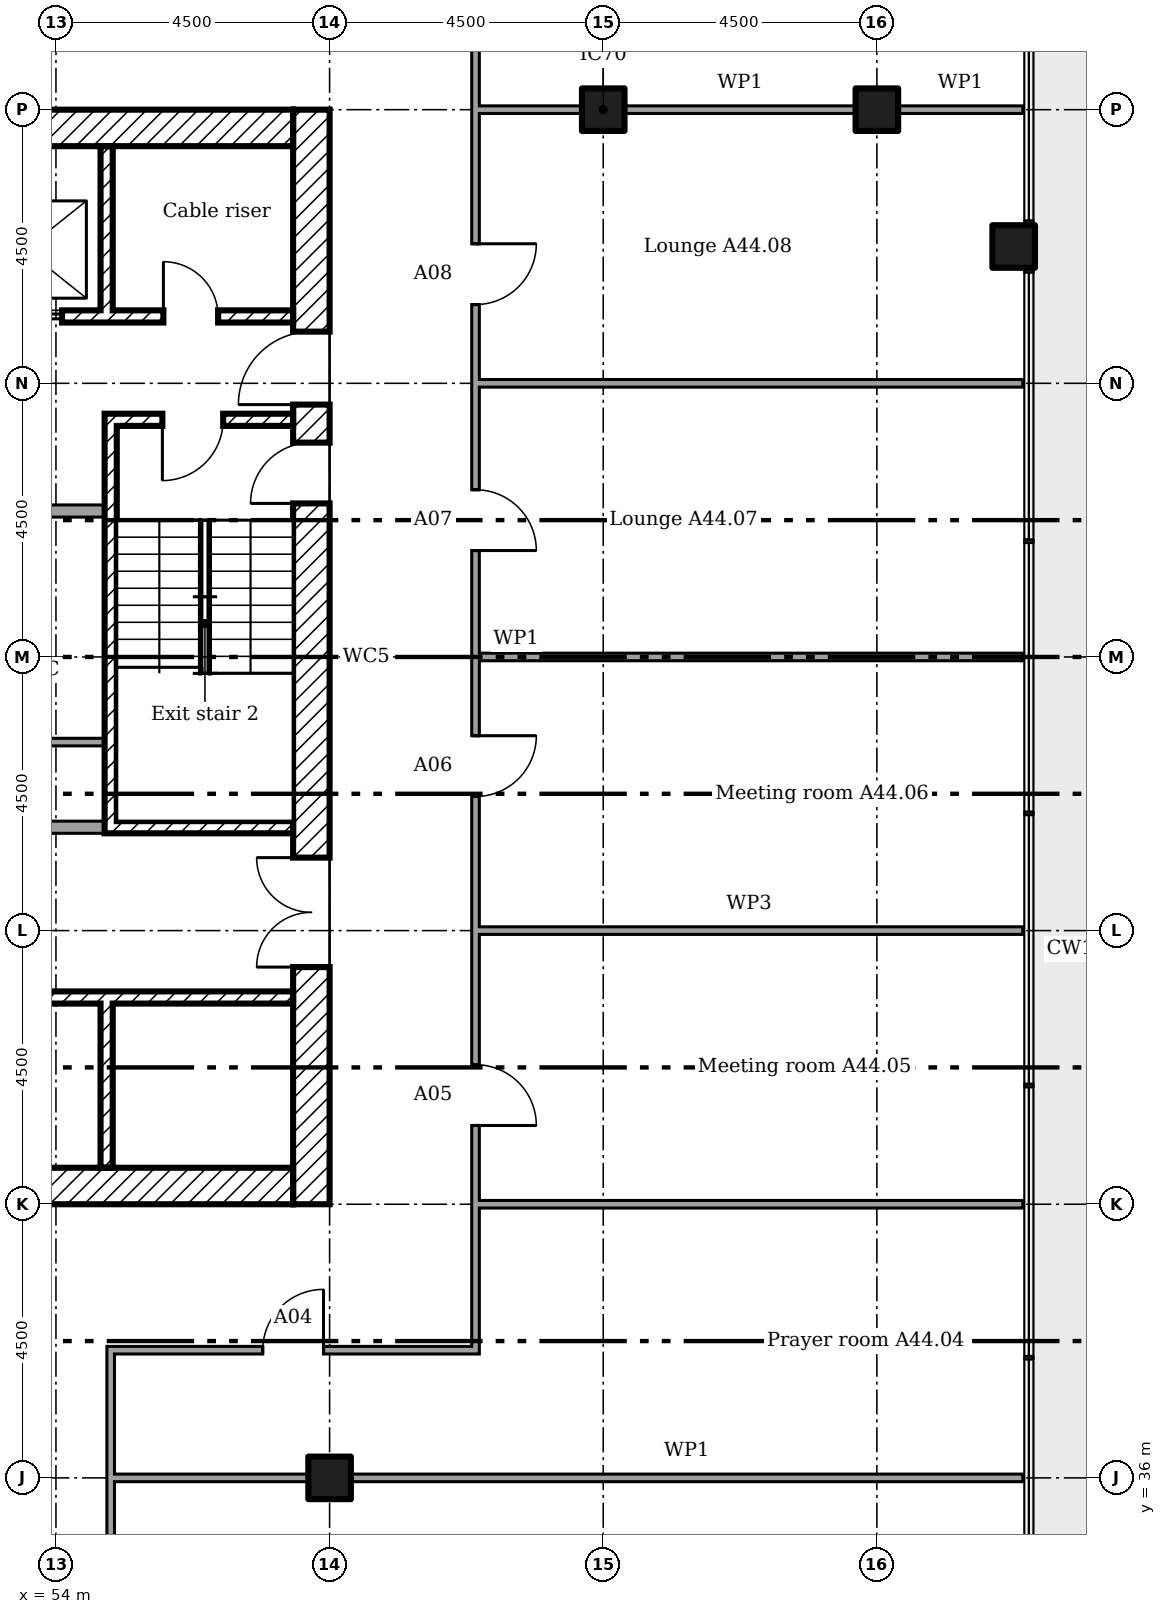
"""IFC4 building model, lengths in metres.
Left out: names, types, materials, properties, quantities, classifications, styles, units other than length and angle.
Written with IfcOpenShell. Run it as: python <this file> out.ifc"""

import sys

from ifc_helpers import new_model, si_unit, direction, frame, frame_2d, origin, origin_2d, place, context, subcontext, project, spatial, rectangle, extrude, element, fill, save


model = new_model("IFC4")
c1 = context("Model", 3, precision=1e-05, world=origin(), true_north=direction((0.0, 1.0)))
c2 = subcontext(c1, "Body", "Model", "MODEL_VIEW")
j1 = project(units=[si_unit("LENGTHUNIT", "METRE"), si_unit("PLANEANGLEUNIT", "RADIAN")], contexts=[c1])
p1 = place(None, origin())
s1 = spatial("IfcSite", under=j1, at=p1, CompositionType="ELEMENT")
p2 = place(p1, origin())
s2 = spatial("IfcBuilding", under=s1, at=p2, CompositionType="ELEMENT")
p3 = place(p2, frame((0.0, 0.0, 176.2)))
s3 = spatial("IfcBuildingStorey", under=s2, at=p3, CompositionType="ELEMENT", Elevation=176.2)
for number, where in (
    (1, (58.5, 36.0, 0.0)),
    (2, (63.0, 58.5, 0.0)),
    (3, (67.5, 58.5, 0.0)),
    (4, (69.75, 56.25, 0.0)),
):
    element("IfcColumn", number, at=place(p3, frame(where)), inside=s3, PredefinedType="COLUMN", context=c2, shape_type="SweptSolid", body=[
        extrude(rectangle(XDim=0.7, YDim=0.7, at=origin_2d()), origin(), (0.0, 0.0, 1.0), 3.6),
    ])
p4 = place(p3, frame((58.2, 40.5, 0.0), z_axis=(0.0, 0.0, 1.0), x_axis=(0.0, 1.0, 0.0)))
e5 = element("IfcWall", 5, at=p4, inside=s3, PredefinedType="SHEAR", context=c2, shape_type="SweptSolid", body=[
    extrude(rectangle(XDim=18.0, YDim=0.6, at=frame_2d((9.0, 0.0))), origin(), (0.0, 0.0, 1.0), 3.35),
])
p5 = place(p4, frame((13.15, 0.0, 0.0)))
e6 = element("IfcOpeningElement", 6, at=p5, cuts=e5, PredefinedType="OPENING", context=c2, shape_type="SweptSolid", body=[
    extrude(rectangle(XDim=1.2, YDim=2.1, at=frame_2d((0.6, 1.05))), frame((0.0, 0.31, 0.0), z_axis=(0.0, -1.0, 0.0), x_axis=(1.0, 0.0, 0.0)), (0.0, 0.0, 1.0), 0.62),
])
p6 = place(p4, frame((3.9, 0.0, 0.0)))
e7 = element("IfcOpeningElement", 7, at=p6, cuts=e5, PredefinedType="OPENING", context=c2, shape_type="SweptSolid", body=[
    extrude(rectangle(XDim=1.8, YDim=2.1, at=frame_2d((0.9, 1.05))), frame((0.0, 0.31, 0.0), z_axis=(0.0, -1.0, 0.0), x_axis=(1.0, 0.0, 0.0)), (0.0, 0.0, 1.0), 0.62),
])
p7 = place(p4, frame((11.525, 0.0, 0.0)))
e8 = element("IfcOpeningElement", 8, at=p7, cuts=e5, PredefinedType="OPENING", context=c2, shape_type="SweptSolid", body=[
    extrude(rectangle(XDim=1.0, YDim=2.1, at=frame_2d((0.5, 1.05))), frame((0.0, 0.31, 0.0), z_axis=(0.0, -1.0, 0.0), x_axis=(1.0, 0.0, 0.0)), (0.0, 0.0, 1.0), 0.62),
])
for number, where in (
    (9, (40.5, 58.2, 0.0)),
    (10, (40.5, 40.8, 0.0)),
):
    element("IfcWall", number, at=place(p3, frame(where)), inside=s3, PredefinedType="SHEAR", context=c2, shape_type="SweptSolid", body=[
        extrude(rectangle(XDim=17.4, YDim=0.6, at=frame_2d((8.7, 0.0))), origin(), (0.0, 0.0, 1.0), 3.35),
    ])
for number, where, z_axis, x_axis in (
    (11, (54.833, 57.9, 0.0), (0.0, 0.0, 1.0), (0.0, -1.0, 0.0)),
    (12, (54.833, 41.1, 0.0), (0.0, 0.0, 1.0), (0.0, 1.0, 0.0)),
):
    element("IfcWall", number, at=place(p3, frame(where, z_axis=z_axis, x_axis=x_axis)), inside=s3, PredefinedType="SHEAR", context=c2, shape_type="SweptSolid", body=[
        extrude(rectangle(XDim=2.7, YDim=0.2, at=frame_2d((1.35, 0.0))), origin(), (0.0, 0.0, 1.0), 3.35),
    ])
p8 = place(p3, frame((46.933, 55.1, 0.0)))
e13 = element("IfcWall", 13, at=p8, inside=s3, PredefinedType="SHEAR", context=c2, shape_type="SweptSolid", body=[
    extrude(rectangle(XDim=10.967, YDim=0.2, at=frame_2d((5.483, 0.0))), origin(), (0.0, 0.0, 1.0), 3.35),
])
p9 = place(p8, frame((8.833, 0.0, 0.0)))
e14 = element("IfcOpeningElement", 14, at=p9, cuts=e13, PredefinedType="OPENING", context=c2, shape_type="SweptSolid", body=[
    extrude(rectangle(XDim=0.9, YDim=2.1, at=frame_2d((0.45, 1.05))), frame((0.0, 0.11, 0.0), z_axis=(0.0, -1.0, 0.0), x_axis=(1.0, 0.0, 0.0)), (0.0, 0.0, 1.0), 0.22),
])
p10 = place(p8, frame((0.633, 0.0, 0.0)))
e15 = element("IfcOpeningElement", 15, at=p10, cuts=e13, PredefinedType="OPENING", context=c2, shape_type="SweptSolid", body=[
    extrude(rectangle(XDim=1.2, YDim=2.1, at=frame_2d((0.6, 1.05))), frame((0.0, 0.11, 0.0), z_axis=(0.0, -1.0, 0.0), x_axis=(1.0, 0.0, 0.0)), (0.0, 0.0, 1.0), 0.22),
])
p11 = place(p8, frame((3.3, 0.0, 0.0)))
e16 = element("IfcOpeningElement", 16, at=p11, cuts=e13, PredefinedType="OPENING", context=c2, shape_type="SweptSolid", body=[
    extrude(rectangle(XDim=1.2, YDim=2.1, at=frame_2d((0.6, 1.05))), frame((0.0, 0.11, 0.0), z_axis=(0.0, -1.0, 0.0), x_axis=(1.0, 0.0, 0.0)), (0.0, 0.0, 1.0), 0.22),
])
p12 = place(p8, frame((5.967, 0.0, 0.0)))
e17 = element("IfcOpeningElement", 17, at=p12, cuts=e13, PredefinedType="OPENING", context=c2, shape_type="SweptSolid", body=[
    extrude(rectangle(XDim=1.2, YDim=2.1, at=frame_2d((0.6, 1.05))), frame((0.0, 0.11, 0.0), z_axis=(0.0, -1.0, 0.0), x_axis=(1.0, 0.0, 0.0)), (0.0, 0.0, 1.0), 0.22),
])
p13 = place(p3, frame((41.1, 43.9, 0.0)))
e18 = element("IfcWall", 18, at=p13, inside=s3, PredefinedType="SHEAR", context=c2, shape_type="SweptSolid", body=[
    extrude(rectangle(XDim=16.8, YDim=0.2, at=frame_2d((8.4, 0.0))), origin(), (0.0, 0.0, 1.0), 3.35),
])
p14 = place(p13, frame((1.283, 0.0, 0.0)))
e19 = element("IfcOpeningElement", 19, at=p14, cuts=e18, PredefinedType="OPENING", context=c2, shape_type="SweptSolid", body=[
    extrude(rectangle(XDim=0.9, YDim=2.1, at=frame_2d((0.45, 1.05))), frame((0.0, 0.11, 0.0), z_axis=(0.0, -1.0, 0.0), x_axis=(1.0, 0.0, 0.0)), (0.0, 0.0, 1.0), 0.22),
])
p15 = place(p13, frame((7.95, 0.0, 0.0)))
e20 = element("IfcOpeningElement", 20, at=p15, cuts=e18, PredefinedType="OPENING", context=c2, shape_type="SweptSolid", body=[
    extrude(rectangle(XDim=0.9, YDim=2.1, at=frame_2d((0.45, 1.05))), frame((0.0, 0.11, 0.0), z_axis=(0.0, -1.0, 0.0), x_axis=(1.0, 0.0, 0.0)), (0.0, 0.0, 1.0), 0.22),
])
p16 = place(p3, frame((54.8, 53.4, 0.0)))
e21 = element("IfcWall", 21, at=p16, inside=s3, PredefinedType="SHEAR", context=c2, shape_type="SweptSolid", body=[
    extrude(rectangle(XDim=3.1, YDim=0.2, at=frame_2d((1.55, 0.0))), origin(), (0.0, 0.0, 1.0), 3.35),
])
p17 = place(p16, frame((0.95, 0.0, 0.0)))
e22 = element("IfcOpeningElement", 22, at=p17, cuts=e21, PredefinedType="OPENING", context=c2, shape_type="SweptSolid", body=[
    extrude(rectangle(XDim=1.0, YDim=2.1, at=frame_2d((0.5, 1.05))), frame((0.0, 0.11, 0.0), z_axis=(0.0, -1.0, 0.0), x_axis=(1.0, 0.0, 0.0)), (0.0, 0.0, 1.0), 0.22),
])
p18 = place(p3, frame((54.8, 46.7, 0.0)))
e23 = element("IfcWall", 23, at=p18, inside=s3, PredefinedType="SHEAR", context=c2, shape_type="SweptSolid", body=[
    extrude(rectangle(XDim=3.1, YDim=0.2, at=frame_2d((1.55, 0.0))), origin(), (0.0, 0.0, 1.0), 3.35),
])
p19 = place(p3, frame((54.9, 46.8, 0.0), z_axis=(0.0, 0.0, 1.0), x_axis=(0.0, 1.0, 0.0)))
e24 = element("IfcWall", 24, at=p19, inside=s3, PredefinedType="SHEAR", context=c2, shape_type="SweptSolid", body=[
    extrude(rectangle(XDim=6.5, YDim=0.2, at=frame_2d((3.25, 0.0))), origin(), (0.0, 0.0, 1.0), 3.35),
])
p20 = place(p3, frame((44.2, 51.9, 0.0)))
e25 = element("IfcWall", 25, at=p20, inside=s3, PredefinedType="PARTITIONING", context=c2, shape_type="SweptSolid", body=[
    extrude(rectangle(XDim=10.6, YDim=0.2, at=frame_2d((5.3, 0.0))), origin(), (0.0, 0.0, 1.0), 3.35),
])
p21 = place(p20, frame((4.625, 0.0, 0.0)))
e26 = element("IfcOpeningElement", 26, at=p21, cuts=e25, PredefinedType="OPENING", context=c2, shape_type="SweptSolid", body=[
    extrude(rectangle(XDim=0.9, YDim=2.1, at=frame_2d((0.45, 1.05))), frame((0.0, 0.11, 0.0), z_axis=(0.0, -1.0, 0.0), x_axis=(1.0, 0.0, 0.0)), (0.0, 0.0, 1.0), 0.22),
])
p22 = place(p20, frame((6.25, 0.0, 0.0)))
e27 = element("IfcOpeningElement", 27, at=p22, cuts=e25, PredefinedType="OPENING", context=c2, shape_type="SweptSolid", body=[
    extrude(rectangle(XDim=0.9, YDim=2.1, at=frame_2d((0.45, 1.05))), frame((0.0, 0.11, 0.0), z_axis=(0.0, -1.0, 0.0), x_axis=(1.0, 0.0, 0.0)), (0.0, 0.0, 1.0), 0.22),
])
p23 = place(p20, frame((8.7, 0.0, 0.0)))
e28 = element("IfcOpeningElement", 28, at=p23, cuts=e25, PredefinedType="OPENING", context=c2, shape_type="SweptSolid", body=[
    extrude(rectangle(XDim=0.9, YDim=2.1, at=frame_2d((0.45, 1.05))), frame((0.0, 0.11, 0.0), z_axis=(0.0, -1.0, 0.0), x_axis=(1.0, 0.0, 0.0)), (0.0, 0.0, 1.0), 0.22),
])
p24 = place(p3, frame((44.2, 46.7, 0.0)))
e29 = element("IfcWall", 29, at=p24, inside=s3, PredefinedType="PARTITIONING", context=c2, shape_type="SweptSolid", body=[
    extrude(rectangle(XDim=10.6, YDim=0.2, at=frame_2d((5.3, 0.0))), origin(), (0.0, 0.0, 1.0), 3.35),
])
p25 = place(p24, frame((4.85, 0.0, 0.0)))
e30 = element("IfcOpeningElement", 30, at=p25, cuts=e29, PredefinedType="OPENING", context=c2, shape_type="SweptSolid", body=[
    extrude(rectangle(XDim=0.9, YDim=2.1, at=frame_2d((0.45, 1.05))), frame((0.0, 0.11, 0.0), z_axis=(0.0, -1.0, 0.0), x_axis=(1.0, 0.0, 0.0)), (0.0, 0.0, 1.0), 0.22),
])
p26 = place(p3, frame((54.8, 48.1, 0.0), z_axis=(0.0, 0.0, 1.0), x_axis=(-1.0, 0.0, 0.0)))
e31 = element("IfcWall", 31, at=p26, inside=s3, PredefinedType="PARTITIONING", context=c2, shape_type="SweptSolid", body=[
    extrude(rectangle(XDim=2.9, YDim=0.125, at=frame_2d((1.45, 0.0))), origin(), (0.0, 0.0, 1.0), 3.35),
])
p27 = place(p3, frame((54.9, 36.0, 0.0)))
e32 = element("IfcWall", 32, at=p27, inside=s3, PredefinedType="PARTITIONING", context=c2, shape_type="SweptSolid", body=[
    extrude(rectangle(XDim=3.25, YDim=0.125, at=frame_2d((1.625, 0.0))), origin(), (0.0, 0.0, 1.0), 3.45),
])
p28 = place(p3, frame((58.85, 36.0, 0.0)))
e33 = element("IfcWall", 33, at=p28, inside=s3, PredefinedType="PARTITIONING", context=c2, shape_type="SweptSolid", body=[
    extrude(rectangle(XDim=11.05, YDim=0.125, at=frame_2d((5.525, 0.0))), origin(), (0.0, 0.0, 1.0), 2.766),
])
p29 = place(p3, frame((54.837, 38.1, 0.0)))
e34 = element("IfcWall", 34, at=p29, inside=s3, PredefinedType="PARTITIONING", context=c2, shape_type="SweptSolid", body=[
    extrude(rectangle(XDim=6.125, YDim=0.125, at=frame_2d((3.062, 0.0))), origin(), (0.0, 0.0, 1.0), 3.45),
])
p30 = place(p29, frame((2.562, 0.0, 0.0)))
e35 = element("IfcOpeningElement", 35, at=p30, cuts=e34, PredefinedType="OPENING", context=c2, shape_type="SweptSolid", body=[
    extrude(rectangle(XDim=1.0, YDim=2.1, at=frame_2d((0.5, 1.05))), frame((0.0, 0.073, 0.0), z_axis=(0.0, -1.0, 0.0), x_axis=(1.0, 0.0, 0.0)), (0.0, 0.0, 1.0), 0.145),
])
p31 = place(p3, frame((60.9, 40.5, 0.0)))
e36 = element("IfcWall", 36, at=p31, inside=s3, PredefinedType="PARTITIONING", context=c2, shape_type="SweptSolid", body=[
    extrude(rectangle(XDim=9.0, YDim=0.125, at=frame_2d((4.5, 0.0))), origin(), (0.0, 0.0, 1.0), 2.766),
])
p32 = place(p3, frame((60.9, 45.0, 0.0)))
e37 = element("IfcWall", 37, at=p32, inside=s3, PredefinedType="MOVABLE", context=c2, shape_type="SweptSolid", body=[
    extrude(rectangle(XDim=9.0, YDim=0.125, at=frame_2d((4.5, 0.0))), origin(), (0.0, 0.0, 1.0), 2.766),
])
for number, where in (
    (38, (60.9, 49.5, 0.0)),
    (39, (60.9, 54.0, 0.0)),
):
    element("IfcWall", number, at=place(p3, frame(where)), inside=s3, PredefinedType="PARTITIONING", context=c2, shape_type="SweptSolid", body=[
        extrude(rectangle(XDim=9.0, YDim=0.125, at=frame_2d((4.5, 0.0))), origin(), (0.0, 0.0, 1.0), 2.766),
    ])
p33 = place(p3, frame((60.9, 58.5, 0.0)))
e40 = element("IfcWall", 40, at=p33, inside=s3, PredefinedType="PARTITIONING", context=c2, shape_type="SweptSolid", body=[
    extrude(rectangle(XDim=1.75, YDim=0.125, at=frame_2d((0.875, 0.0))), origin(), (0.0, 0.0, 1.0), 2.676),
])
p34 = place(p3, frame((63.35, 58.5, 0.0)))
e41 = element("IfcWall", 41, at=p34, inside=s3, PredefinedType="PARTITIONING", context=c2, shape_type="SweptSolid", body=[
    extrude(rectangle(XDim=3.8, YDim=0.125, at=frame_2d((1.9, 0.0))), origin(), (0.0, 0.0, 1.0), 2.676),
])
p35 = place(p3, frame((67.85, 58.5, 0.0)))
e42 = element("IfcWall", 42, at=p35, inside=s3, PredefinedType="PARTITIONING", context=c2, shape_type="SweptSolid", body=[
    extrude(rectangle(XDim=2.05, YDim=0.125, at=frame_2d((1.025, 0.0))), origin(), (0.0, 0.0, 1.0), 2.676),
])
p36 = place(p3, frame((54.9, 29.1, 0.0), z_axis=(0.0, 0.0, 1.0), x_axis=(0.0, 1.0, 0.0)))
e43 = element("IfcWall", 43, at=p36, inside=s3, PredefinedType="PARTITIONING", context=c2, shape_type="SweptSolid", body=[
    extrude(rectangle(XDim=8.938, YDim=0.125, at=frame_2d((4.469, 0.0))), origin(), (0.0, 0.0, 1.0), 3.45),
])
p37 = place(p36, frame((3.825, 0.0, 0.0)))
e44 = element("IfcOpeningElement", 44, at=p37, cuts=e43, PredefinedType="OPENING", context=c2, shape_type="SweptSolid", body=[
    extrude(rectangle(XDim=1.0, YDim=2.1, at=frame_2d((0.5, 1.05))), frame((0.0, 0.073, 0.0), z_axis=(0.0, -1.0, 0.0), x_axis=(1.0, 0.0, 0.0)), (0.0, 0.0, 1.0), 0.145),
])
p38 = place(p3, frame((60.9, 38.163, 0.0), z_axis=(0.0, 0.0, 1.0), x_axis=(0.0, 1.0, 0.0)))
e45 = element("IfcWall", 45, at=p38, inside=s3, PredefinedType="PARTITIONING", context=c2, shape_type="SweptSolid", body=[
    extrude(rectangle(XDim=23.275, YDim=0.125, at=frame_2d((11.637, 0.0))), origin(), (0.0, 0.0, 1.0), 3.45),
])
p39 = place(p38, frame((3.633, 0.0, 0.0)))
e46 = element("IfcOpeningElement", 46, at=p39, cuts=e45, PredefinedType="OPENING", context=c2, shape_type="SweptSolid", body=[
    extrude(rectangle(XDim=1.0, YDim=2.1, at=frame_2d((0.5, 1.05))), frame((0.0, 0.073, 0.0), z_axis=(0.0, -1.0, 0.0), x_axis=(1.0, 0.0, 0.0)), (0.0, 0.0, 1.0), 0.145),
])
p40 = place(p38, frame((9.042, 0.0, 0.0)))
e47 = element("IfcOpeningElement", 47, at=p40, cuts=e45, PredefinedType="OPENING", context=c2, shape_type="SweptSolid", body=[
    extrude(rectangle(XDim=1.0, YDim=2.1, at=frame_2d((0.5, 1.05))), frame((0.0, 0.073, 0.0), z_axis=(0.0, -1.0, 0.0), x_axis=(1.0, 0.0, 0.0)), (0.0, 0.0, 1.0), 0.145),
])
p41 = place(p38, frame((13.087, 0.0, 0.0)))
e48 = element("IfcOpeningElement", 48, at=p41, cuts=e45, PredefinedType="OPENING", context=c2, shape_type="SweptSolid", body=[
    extrude(rectangle(XDim=1.0, YDim=2.1, at=frame_2d((0.5, 1.05))), frame((0.0, 0.073, 0.0), z_axis=(0.0, -1.0, 0.0), x_axis=(1.0, 0.0, 0.0)), (0.0, 0.0, 1.0), 0.145),
])
p42 = place(p38, frame((17.133, 0.0, 0.0)))
e49 = element("IfcOpeningElement", 49, at=p42, cuts=e45, PredefinedType="OPENING", context=c2, shape_type="SweptSolid", body=[
    extrude(rectangle(XDim=1.0, YDim=2.1, at=frame_2d((0.5, 1.05))), frame((0.0, 0.073, 0.0), z_axis=(0.0, -1.0, 0.0), x_axis=(1.0, 0.0, 0.0)), (0.0, 0.0, 1.0), 0.145),
])
p43 = place(p5, origin())
e50 = element("IfcDoor", 50, at=p43, inside=s3, OperationType="SINGLE_SWING_RIGHT", PredefinedType="DOOR", context=c2, shape_type="SweptSolid", body=[
    extrude(rectangle(XDim=1.2, YDim=2.1, at=frame_2d((0.6, 1.05))), frame((0.0, 0.025, 0.0), z_axis=(0.0, -1.0, 0.0), x_axis=(1.0, 0.0, 0.0)), (0.0, 0.0, 1.0), 0.05),
])
fill(e6, e50)
p44 = place(p6, origin())
e51 = element("IfcDoor", 51, at=p44, inside=s3, OperationType="DOUBLE_DOOR_SINGLE_SWING", PredefinedType="DOOR", context=c2, shape_type="SweptSolid", body=[
    extrude(rectangle(XDim=1.8, YDim=2.1, at=frame_2d((0.9, 1.05))), frame((0.0, 0.025, 0.0), z_axis=(0.0, -1.0, 0.0), x_axis=(1.0, 0.0, 0.0)), (0.0, 0.0, 1.0), 0.05),
])
fill(e7, e51)
p45 = place(p17, frame((1.0, 0.0, 0.0), x_axis=(-1.0, 0.0, 0.0)))
e52 = element("IfcDoor", 52, at=p45, inside=s3, OperationType="SINGLE_SWING_LEFT", PredefinedType="DOOR", context=c2, shape_type="SweptSolid", body=[
    extrude(rectangle(XDim=1.0, YDim=2.1, at=frame_2d((0.5, 1.05))), frame((0.0, 0.025, 0.0), z_axis=(0.0, -1.0, 0.0), x_axis=(1.0, 0.0, 0.0)), (0.0, 0.0, 1.0), 0.05),
])
fill(e22, e52)
p46 = place(p7, origin())
e53 = element("IfcDoor", 53, at=p46, inside=s3, OperationType="SINGLE_SWING_RIGHT", PredefinedType="DOOR", context=c2, shape_type="SweptSolid", body=[
    extrude(rectangle(XDim=1.0, YDim=2.1, at=frame_2d((0.5, 1.05))), frame((0.0, 0.025, 0.0), z_axis=(0.0, -1.0, 0.0), x_axis=(1.0, 0.0, 0.0)), (0.0, 0.0, 1.0), 0.05),
])
fill(e8, e53)
p47 = place(p9, origin())
e54 = element("IfcDoor", 54, at=p47, inside=s3, OperationType="SINGLE_SWING_RIGHT", PredefinedType="DOOR", context=c2, shape_type="SweptSolid", body=[
    extrude(rectangle(XDim=0.9, YDim=2.1, at=frame_2d((0.45, 1.05))), frame((0.0, 0.025, 0.0), z_axis=(0.0, -1.0, 0.0), x_axis=(1.0, 0.0, 0.0)), (0.0, 0.0, 1.0), 0.05),
])
fill(e14, e54)
p48 = place(p12, origin())
e55 = element("IfcDoor", 55, at=p48, inside=s3, OperationType="SLIDING_TO_LEFT", PredefinedType="DOOR", context=c2, shape_type="SweptSolid", body=[
    extrude(rectangle(XDim=1.2, YDim=2.1, at=frame_2d((0.6, 1.05))), frame((0.0, 0.025, 0.0), z_axis=(0.0, -1.0, 0.0), x_axis=(1.0, 0.0, 0.0)), (0.0, 0.0, 1.0), 0.05),
])
fill(e17, e55)
p49 = place(p30, origin())
e56 = element("IfcDoor", 56, at=p49, inside=s3, OperationType="SINGLE_SWING_LEFT", PredefinedType="DOOR", context=c2, shape_type="SweptSolid", body=[
    extrude(rectangle(XDim=1.0, YDim=2.1, at=frame_2d((0.5, 1.05))), frame((0.0, 0.025, 0.0), z_axis=(0.0, -1.0, 0.0), x_axis=(1.0, 0.0, 0.0)), (0.0, 0.0, 1.0), 0.05),
])
fill(e35, e56)
p50 = place(p39, frame((1.0, 0.0, 0.0), x_axis=(-1.0, 0.0, 0.0)))
e57 = element("IfcDoor", 57, at=p50, inside=s3, OperationType="SINGLE_SWING_LEFT", PredefinedType="DOOR", context=c2, shape_type="SweptSolid", body=[
    extrude(rectangle(XDim=1.0, YDim=2.1, at=frame_2d((0.5, 1.05))), frame((0.0, 0.025, 0.0), z_axis=(0.0, -1.0, 0.0), x_axis=(1.0, 0.0, 0.0)), (0.0, 0.0, 1.0), 0.05),
])
fill(e46, e57)
p51 = place(p40, frame((1.0, 0.0, 0.0), x_axis=(-1.0, 0.0, 0.0)))
e58 = element("IfcDoor", 58, at=p51, inside=s3, OperationType="SINGLE_SWING_RIGHT", PredefinedType="DOOR", context=c2, shape_type="SweptSolid", body=[
    extrude(rectangle(XDim=1.0, YDim=2.1, at=frame_2d((0.5, 1.05))), frame((0.0, 0.025, 0.0), z_axis=(0.0, -1.0, 0.0), x_axis=(1.0, 0.0, 0.0)), (0.0, 0.0, 1.0), 0.05),
])
fill(e47, e58)
p52 = place(p41, frame((1.0, 0.0, 0.0), x_axis=(-1.0, 0.0, 0.0)))
e59 = element("IfcDoor", 59, at=p52, inside=s3, OperationType="SINGLE_SWING_LEFT", PredefinedType="DOOR", context=c2, shape_type="SweptSolid", body=[
    extrude(rectangle(XDim=1.0, YDim=2.1, at=frame_2d((0.5, 1.05))), frame((0.0, 0.025, 0.0), z_axis=(0.0, -1.0, 0.0), x_axis=(1.0, 0.0, 0.0)), (0.0, 0.0, 1.0), 0.05),
])
fill(e48, e59)
p53 = place(p42, frame((1.0, 0.0, 0.0), x_axis=(-1.0, 0.0, 0.0)))
e60 = element("IfcDoor", 60, at=p53, inside=s3, OperationType="SINGLE_SWING_RIGHT", PredefinedType="DOOR", context=c2, shape_type="SweptSolid", body=[
    extrude(rectangle(XDim=1.0, YDim=2.1, at=frame_2d((0.5, 1.05))), frame((0.0, 0.025, 0.0), z_axis=(0.0, -1.0, 0.0), x_axis=(1.0, 0.0, 0.0)), (0.0, 0.0, 1.0), 0.05),
])
fill(e49, e60)
save(model, sys.argv[1])
